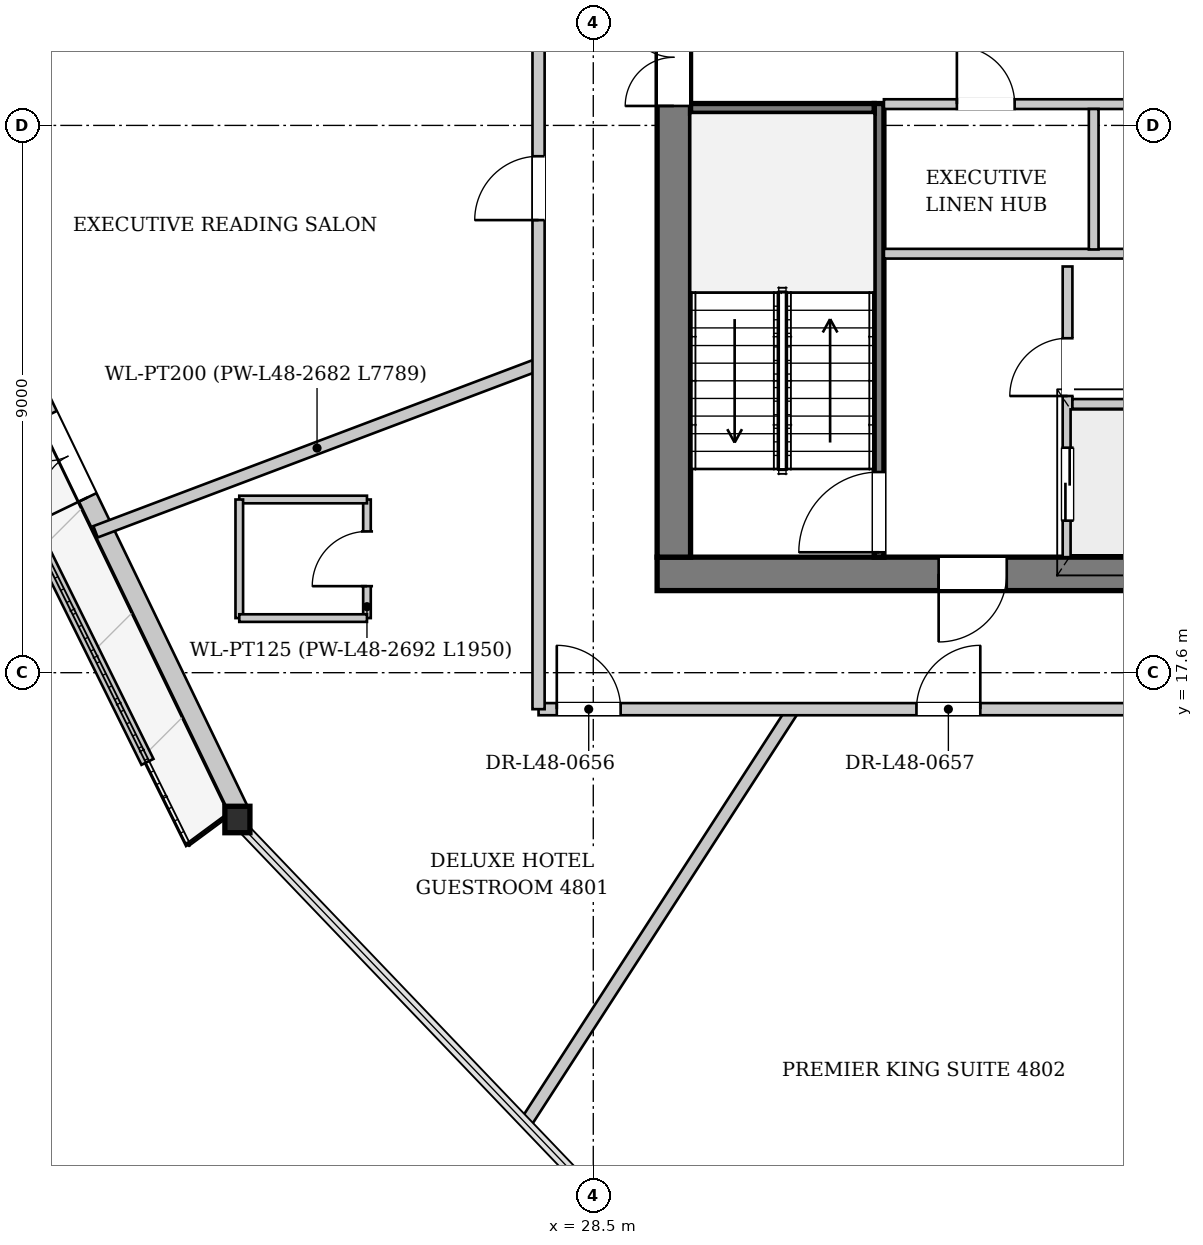
"""IFC4 building model, lengths in metres.
Left out: names, types, materials, properties, quantities, classifications, styles, units other than length and angle.
Written with IfcOpenShell. Run it as: python <this file> out.ifc"""

import sys

from ifc_helpers import new_model, si_unit, direction, frame, frame_2d, origin, origin_2d, place, context, subcontext, project, spatial, rectangle, i_section, extrude, source, transform, mapped, element, fill, save


model = new_model("IFC4")
c1 = context("Model", 3, precision=1e-05, world=origin(), true_north=direction((0.0, 1.0)))
c2 = subcontext(c1, "Body", "Model", "MODEL_VIEW")
j1 = project(units=[si_unit("LENGTHUNIT", "METRE"), si_unit("PLANEANGLEUNIT", "RADIAN")], contexts=[c1])
p1 = place(None, origin())
s1 = spatial("IfcSite", under=j1, at=p1, CompositionType="ELEMENT")
p2 = place(p1, origin())
s2 = spatial("IfcBuilding", under=s1, at=p2, CompositionType="ELEMENT")
p3 = place(p2, frame((0.0, 0.0, 182.1)))
s3 = spatial("IfcBuildingStorey", under=s2, at=p3, CompositionType="ELEMENT", Elevation=182.1)
m1 = source(origin(), c2, "Body", "SweptSolid", [
    extrude(i_section(OverallWidth=0.412, OverallDepth=0.435, WebThickness=0.031, FlangeThickness=0.05, at=origin_2d()), origin(), (0.0, 0.0, 1.0), 3.4),
])
p4 = place(p3, frame((22.519, 15.279, 0.0), z_axis=(0.07518697246, -0.054648792781, 0.995670843512), x_axis=(0.587941984646, 0.808903098455, 0.0)))
e1 = element("IfcColumn", 1, at=p4, inside=s3, PredefinedType="COLUMN", context=c2, shape_type="MappedRepresentation", body=[
    mapped(m1, transform((0.0, 0.0, 0.0), x_axis=(1.0, 0.0, 0.0), y_axis=(0.0, 1.0, 0.0), z_axis=(0.0, 0.0, 1.0), scale=1.0)),
])
p5 = place(p3, frame((22.664, 15.348, 0.0), z_axis=(0.0, 0.0, 1.0), x_axis=(-0.434690054068, 0.900580122418, 0.0)))
e2 = element("IfcWall", 2, at=p5, inside=s3, PredefinedType="SOLIDWALL", context=c2, shape_type="SweptSolid", body=[
    extrude(rectangle(XDim=17.818, YDim=0.32, at=frame_2d((8.909, 0.0))), origin(), (0.0, 0.0, 1.0), 2.722),
])
p6 = place(p5, frame((5.702, 0.0, 0.0)))
e3 = element("IfcOpeningElement", 3, at=p6, cuts=e2, PredefinedType="OPENING", context=c2, shape_type="SweptSolid", body=[
    extrude(rectangle(XDim=1.5, YDim=2.3, at=frame_2d((0.75, 1.15))), frame((0.0, 0.17, 0.0), z_axis=(0.0, -1.0, 0.0), x_axis=(1.0, 0.0, 0.0)), (0.0, 0.0, 1.0), 0.34),
])
p7 = place(p5, frame((11.885, 0.0, 0.252)))
e4 = element("IfcOpeningElement", 4, at=p7, cuts=e2, PredefinedType="OPENING", context=c2, shape_type="SweptSolid", body=[
    extrude(rectangle(XDim=2.6, YDim=2.35, at=frame_2d((1.3, 1.175))), frame((0.0, 0.17, 0.0), z_axis=(0.0, -1.0, 0.0), x_axis=(1.0, 0.0, 0.0)), (0.0, 0.0, 1.0), 0.34),
])
p8 = place(p3, frame((14.129, 30.381, 0.0), z_axis=(0.0, 0.0, 1.0), x_axis=(0.442956113231, -0.896543296083, 0.0)))
e5 = element("IfcWall", 5, at=p8, inside=s3, PredefinedType="PARAPET", context=c2, shape_type="SweptSolid", body=[
    extrude(rectangle(XDim=15.892, YDim=0.22, at=frame_2d((7.946, 0.0))), origin(), (0.0, 0.0, 1.0), 0.3),
])
p9 = place(p3, frame((46.45, 19.225, 0.0), z_axis=(0.0, 0.0, 1.0), x_axis=(-1.0, 0.0, 0.0)))
e6 = element("IfcWall", 6, at=p9, inside=s3, PredefinedType="SHEAR", context=c2, shape_type="SweptSolid", body=[
    extrude(rectangle(XDim=16.9, YDim=0.55, at=frame_2d((8.45, 0.0))), origin(), (0.0, 0.0, 1.0), 3.33),
])
p10 = place(p9, frame((4.65, 0.0, 0.0)))
e7 = element("IfcOpeningElement", 7, at=p10, cuts=e6, PredefinedType="OPENING", context=c2, shape_type="SweptSolid", body=[
    extrude(rectangle(XDim=1.12, YDim=2.25, at=frame_2d((0.56, 1.125))), frame((0.0, 0.285, 0.0), z_axis=(0.0, -1.0, 0.0), x_axis=(1.0, 0.0, 0.0)), (0.0, 0.0, 1.0), 0.57),
])
p11 = place(p9, frame((11.15, 0.0, 0.0)))
e8 = element("IfcOpeningElement", 8, at=p11, cuts=e6, PredefinedType="OPENING", context=c2, shape_type="SweptSolid", body=[
    extrude(rectangle(XDim=1.12, YDim=2.25, at=frame_2d((0.56, 1.125))), frame((0.0, 0.285, 0.0), z_axis=(0.0, -1.0, 0.0), x_axis=(1.0, 0.0, 0.0)), (0.0, 0.0, 1.0), 0.57),
])
p12 = place(p3, frame((29.825, 19.5, 0.0), z_axis=(0.0, 0.0, 1.0), x_axis=(0.0, 1.0, 0.0)))
e9 = element("IfcWall", 9, at=p12, inside=s3, PredefinedType="SHEAR", context=c2, shape_type="SweptSolid", body=[
    extrude(rectangle(XDim=14.2, YDim=0.55, at=frame_2d((7.1, 0.0))), origin(), (0.0, 0.0, 1.0), 3.33),
])
p13 = place(p12, frame((7.42, 0.0, 0.0)))
e10 = element("IfcOpeningElement", 10, at=p13, cuts=e9, PredefinedType="OPENING", context=c2, shape_type="SweptSolid", body=[
    extrude(rectangle(XDim=1.6, YDim=2.2, at=frame_2d((0.8, 1.1))), frame((0.0, 0.285, 0.0), z_axis=(0.0, -1.0, 0.0), x_axis=(1.0, 0.0, 0.0)), (0.0, 0.0, 1.0), 0.57),
])
p14 = place(p3, frame((33.2, 19.5, 0.0), z_axis=(0.0, 0.0, 1.0), x_axis=(0.0, 1.0, 0.0)))
e11 = element("IfcWall", 11, at=p14, inside=s3, PredefinedType="PARTITIONING", context=c2, shape_type="SweptSolid", body=[
    extrude(rectangle(XDim=7.46, YDim=0.16, at=frame_2d((3.73, 0.0))), origin(), (0.0, 0.0, 1.0), 3.33),
])
p15 = place(p14, frame((0.08, 0.0, 0.0)))
e12 = element("IfcOpeningElement", 12, at=p15, cuts=e11, PredefinedType="OPENING", context=c2, shape_type="SweptSolid", body=[
    extrude(rectangle(XDim=1.32, YDim=2.2, at=frame_2d((0.66, 1.1))), frame((0.0, 0.09, 0.0), z_axis=(0.0, -1.0, 0.0), x_axis=(1.0, 0.0, 0.0)), (0.0, 0.0, 1.0), 0.18),
])
p16 = place(p3, frame((30.1, 26.88, 0.0), z_axis=(0.0, 0.0, 1.0), x_axis=(1.0, 0.0, 0.0)))
e13 = element("IfcWall", 13, at=p16, inside=s3, PredefinedType="PARTITIONING", context=c2, shape_type="SweptSolid", body=[
    extrude(rectangle(XDim=3.02, YDim=0.16, at=frame_2d((1.51, 0.0))), origin(), (0.0, 0.0, 1.0), 3.33),
])
p17 = place(p3, frame((36.3, 19.5, 0.0), z_axis=(0.0, 0.0, 1.0), x_axis=(0.0, 1.0, 0.0)))
e14 = element("IfcWall", 14, at=p17, inside=s3, PredefinedType="PARTITIONING", context=c2, shape_type="SweptSolid", body=[
    extrude(rectangle(XDim=4.78, YDim=0.16, at=frame_2d((2.39, 0.0))), origin(), (0.0, 0.0, 1.0), 3.33),
])
p18 = place(p17, frame((0.6, 0.0, 0.0)))
e15 = element("IfcOpeningElement", 15, at=p18, cuts=e14, PredefinedType="OPENING", context=c2, shape_type="SweptSolid", body=[
    extrude(rectangle(XDim=1.2, YDim=2.2, at=frame_2d((0.6, 1.1))), frame((0.0, 0.09, 0.0), z_axis=(0.0, -1.0, 0.0), x_axis=(1.0, 0.0, 0.0)), (0.0, 0.0, 1.0), 0.18),
])
p19 = place(p17, frame((2.65, 0.0, 0.0)))
e16 = element("IfcOpeningElement", 16, at=p19, cuts=e14, PredefinedType="OPENING", context=c2, shape_type="SweptSolid", body=[
    extrude(rectangle(XDim=0.95, YDim=2.1, at=frame_2d((0.475, 1.05))), frame((0.0, 0.09, 0.0), z_axis=(0.0, -1.0, 0.0), x_axis=(1.0, 0.0, 0.0)), (0.0, 0.0, 1.0), 0.18),
])
p20 = place(p3, frame((36.38, 22.02, 0.0), z_axis=(0.0, 0.0, 1.0), x_axis=(1.0, 0.0, 0.0)))
e17 = element("IfcWall", 17, at=p20, inside=s3, PredefinedType="PARTITIONING", context=c2, shape_type="SweptSolid", body=[
    extrude(rectangle(XDim=3.24, YDim=0.16, at=frame_2d((1.62, 0.0))), origin(), (0.0, 0.0, 1.0), 3.33),
])
p21 = place(p3, frame((33.28, 24.49, 0.0), z_axis=(0.0, 0.0, 1.0), x_axis=(1.0, 0.0, 0.0)))
e18 = element("IfcWall", 18, at=p21, inside=s3, PredefinedType="PARTITIONING", context=c2, shape_type="SweptSolid", body=[
    extrude(rectangle(XDim=9.44, YDim=0.16, at=frame_2d((4.72, 0.0))), origin(), (0.0, 0.0, 1.0), 3.33),
])
p22 = place(p3, frame((33.28, 26.95, 0.0), z_axis=(0.0, 0.0, 1.0), x_axis=(1.0, 0.0, 0.0)))
e19 = element("IfcWall", 19, at=p22, inside=s3, PredefinedType="PARTITIONING", context=c2, shape_type="SweptSolid", body=[
    extrude(rectangle(XDim=9.44, YDim=0.16, at=frame_2d((4.72, 0.0))), origin(), (0.0, 0.0, 1.0), 3.33),
])
p23 = place(p22, frame((1.2, 0.0, 0.0)))
e20 = element("IfcOpeningElement", 20, at=p23, cuts=e19, PredefinedType="OPENING", context=c2, shape_type="SweptSolid", body=[
    extrude(rectangle(XDim=0.95, YDim=2.1, at=frame_2d((0.475, 1.05))), frame((0.0, 0.09, 0.0), z_axis=(0.0, -1.0, 0.0), x_axis=(1.0, 0.0, 0.0)), (0.0, 0.0, 1.0), 0.18),
])
p24 = place(p22, frame((4.65, 0.0, 0.0)))
e21 = element("IfcOpeningElement", 21, at=p24, cuts=e19, PredefinedType="OPENING", context=c2, shape_type="SweptSolid", body=[
    extrude(rectangle(XDim=0.95, YDim=2.1, at=frame_2d((0.475, 1.05))), frame((0.0, 0.09, 0.0), z_axis=(0.0, -1.0, 0.0), x_axis=(1.0, 0.0, 0.0)), (0.0, 0.0, 1.0), 0.18),
])
p25 = place(p22, frame((7.67, 0.0, 0.0)))
e22 = element("IfcOpeningElement", 22, at=p25, cuts=e19, PredefinedType="OPENING", context=c2, shape_type="SweptSolid", body=[
    extrude(rectangle(XDim=1.1, YDim=2.2, at=frame_2d((0.55, 1.1))), frame((0.0, 0.09, 0.0), z_axis=(0.0, -1.0, 0.0), x_axis=(1.0, 0.0, 0.0)), (0.0, 0.0, 1.0), 0.18),
])
p26 = place(p3, frame((36.73, 24.56, 0.0), z_axis=(0.0, 0.0, 1.0), x_axis=(0.0, 1.0, 0.0)))
e23 = element("IfcWall", 23, at=p26, inside=s3, PredefinedType="PARTITIONING", context=c2, shape_type="SweptSolid", body=[
    extrude(rectangle(XDim=2.31, YDim=0.16, at=frame_2d((1.155, 0.0))), origin(), (0.0, 0.0, 1.0), 3.33),
])
p27 = place(p3, frame((27.6, 22.67, 0.0), z_axis=(0.0, 0.0, 1.0), x_axis=(-0.935445148769, -0.353471885225, 0.0)))
e24 = element("IfcWall", 24, at=p27, inside=s3, PredefinedType="PARTITIONING", context=c2, shape_type="SweptSolid", body=[
    extrude(rectangle(XDim=7.789, YDim=0.2, at=frame_2d((3.895, 0.0))), origin(), (0.0, 0.0, 1.0), 3.33),
])
p28 = place(p3, frame((31.791, 17.0, 0.0), z_axis=(0.0, 0.0, 1.0), x_axis=(-0.543103391012, -0.839665830358, 0.0)))
e25 = element("IfcWall", 25, at=p28, inside=s3, PredefinedType="PARTITIONING", context=c2, shape_type="SweptSolid", body=[
    extrude(rectangle(XDim=8.078, YDim=0.2, at=frame_2d((4.039, 0.0))), origin(), (0.0, 0.0, 1.0), 3.33),
])
p29 = place(p3, frame((24.778, 18.498, 0.0), z_axis=(0.0, 0.0, 1.0), x_axis=(0.0, 1.0, 0.0)))
e26 = element("IfcWall", 26, at=p29, inside=s3, PredefinedType="PARTITIONING", context=c2, shape_type="SweptSolid", body=[
    extrude(rectangle(XDim=1.95, YDim=0.125, at=frame_2d((0.975, 0.0))), origin(), (0.0, 0.0, 1.0), 3.015),
])
p30 = place(p29, frame((0.525, 0.0, 0.0)))
e27 = element("IfcOpeningElement", 27, at=p30, cuts=e26, PredefinedType="OPENING", context=c2, shape_type="SweptSolid", body=[
    extrude(rectangle(XDim=0.9, YDim=2.1, at=frame_2d((0.45, 1.05))), frame((0.0, 0.073, 0.0), z_axis=(0.0, -1.0, 0.0), x_axis=(1.0, 0.0, 0.0)), (0.0, 0.0, 1.0), 0.145),
])
p31 = place(p3, frame((24.778, 20.448, 0.0), z_axis=(0.0, 0.0, 1.0), x_axis=(-1.0, 0.0, 0.0)))
e28 = element("IfcWall", 28, at=p31, inside=s3, PredefinedType="PARTITIONING", context=c2, shape_type="SweptSolid", body=[
    extrude(rectangle(XDim=2.1, YDim=0.125, at=frame_2d((1.05, 0.0))), origin(), (0.0, 0.0, 1.0), 3.33),
])
p32 = place(p3, frame((22.678, 20.448, 0.0), z_axis=(0.0, 0.0, 1.0), x_axis=(0.0, -1.0, 0.0)))
e29 = element("IfcWall", 29, at=p32, inside=s3, PredefinedType="PARTITIONING", context=c2, shape_type="SweptSolid", body=[
    extrude(rectangle(XDim=1.95, YDim=0.125, at=frame_2d((0.975, 0.0))), origin(), (0.0, 0.0, 1.0), 3.33),
])
p33 = place(p3, frame((22.678, 18.498, 0.0), z_axis=(0.0, 0.0, 1.0), x_axis=(1.0, 0.0, 0.0)))
e30 = element("IfcWall", 30, at=p33, inside=s3, PredefinedType="PARTITIONING", context=c2, shape_type="SweptSolid", body=[
    extrude(rectangle(XDim=2.1, YDim=0.125, at=frame_2d((1.05, 0.0))), origin(), (0.0, 0.0, 1.0), 3.33),
])
p34 = place(p3, frame((27.6, 17.0, 0.0), z_axis=(0.0, 0.0, 1.0), x_axis=(1.0, 0.0, 0.0)))
e31 = element("IfcWall", 31, at=p34, inside=s3, PredefinedType="PARTITIONING", context=c2, shape_type="SweptSolid", body=[
    extrude(rectangle(XDim=20.8, YDim=0.2, at=frame_2d((10.4, 0.0))), origin(), (0.0, 0.0, 1.0), 3.33),
])
p35 = place(p34, frame((0.3, 0.0, 0.0)))
e32 = element("IfcOpeningElement", 32, at=p35, cuts=e31, PredefinedType="OPENING", context=c2, shape_type="SweptSolid", body=[
    extrude(rectangle(XDim=1.05, YDim=2.2, at=frame_2d((0.525, 1.1))), frame((0.0, 0.11, 0.0), z_axis=(0.0, -1.0, 0.0), x_axis=(1.0, 0.0, 0.0)), (0.0, 0.0, 1.0), 0.22),
])
p36 = place(p34, frame((6.215, 0.0, 0.0)))
e33 = element("IfcOpeningElement", 33, at=p36, cuts=e31, PredefinedType="OPENING", context=c2, shape_type="SweptSolid", body=[
    extrude(rectangle(XDim=1.05, YDim=2.2, at=frame_2d((0.525, 1.1))), frame((0.0, 0.11, 0.0), z_axis=(0.0, -1.0, 0.0), x_axis=(1.0, 0.0, 0.0)), (0.0, 0.0, 1.0), 0.22),
])
p37 = place(p34, frame((14.998, 0.0, 0.0)))
e34 = element("IfcOpeningElement", 34, at=p37, cuts=e31, PredefinedType="OPENING", context=c2, shape_type="SweptSolid", body=[
    extrude(rectangle(XDim=1.05, YDim=2.2, at=frame_2d((0.525, 1.1))), frame((0.0, 0.11, 0.0), z_axis=(0.0, -1.0, 0.0), x_axis=(1.0, 0.0, 0.0)), (0.0, 0.0, 1.0), 0.22),
])
p38 = place(p34, frame((19.45, 0.0, 0.0)))
e35 = element("IfcOpeningElement", 35, at=p38, cuts=e31, PredefinedType="OPENING", context=c2, shape_type="SweptSolid", body=[
    extrude(rectangle(XDim=1.05, YDim=2.2, at=frame_2d((0.525, 1.1))), frame((0.0, 0.11, 0.0), z_axis=(0.0, -1.0, 0.0), x_axis=(1.0, 0.0, 0.0)), (0.0, 0.0, 1.0), 0.22),
])
p39 = place(p3, frame((27.6, 17.0, 0.0), z_axis=(0.0, 0.0, 1.0), x_axis=(0.0, 1.0, 0.0)))
e36 = element("IfcWall", 36, at=p39, inside=s3, PredefinedType="PARTITIONING", context=c2, shape_type="SweptSolid", body=[
    extrude(rectangle(XDim=19.2, YDim=0.2, at=frame_2d((9.6, 0.0))), origin(), (0.0, 0.0, 1.0), 3.33),
])
p40 = place(p39, frame((17.85, 0.0, 0.0)))
e37 = element("IfcOpeningElement", 37, at=p40, cuts=e36, PredefinedType="OPENING", context=c2, shape_type="SweptSolid", body=[
    extrude(rectangle(XDim=1.05, YDim=2.2, at=frame_2d((0.525, 1.1))), frame((0.0, 0.11, 0.0), z_axis=(0.0, -1.0, 0.0), x_axis=(1.0, 0.0, 0.0)), (0.0, 0.0, 1.0), 0.22),
])
p41 = place(p39, frame((8.043, 0.0, 0.0)))
e38 = element("IfcOpeningElement", 38, at=p41, cuts=e36, PredefinedType="OPENING", context=c2, shape_type="SweptSolid", body=[
    extrude(rectangle(XDim=1.05, YDim=2.2, at=frame_2d((0.525, 1.1))), frame((0.0, 0.11, 0.0), z_axis=(0.0, -1.0, 0.0), x_axis=(1.0, 0.0, 0.0)), (0.0, 0.0, 1.0), 0.22),
])
m2 = source(origin(), c2, "Body", "SweptSolid", [
    extrude(rectangle(XDim=1.5, YDim=2.3, at=frame_2d((0.75, 1.15))), frame((0.0, 0.025, 0.0), z_axis=(0.0, -1.0, 0.0), x_axis=(1.0, 0.0, 0.0)), (0.0, 0.0, 1.0), 0.05),
])
p42 = place(p6, origin())
e39 = element("IfcDoor", 39, at=p42, inside=s3, OperationType="DOUBLE_DOOR_SINGLE_SWING", PredefinedType="DOOR", context=c2, shape_type="MappedRepresentation", body=[
    mapped(m2, transform((0.0, 0.0, 0.0), x_axis=(1.0, 0.0, 0.0), y_axis=(0.0, 1.0, 0.0), z_axis=(0.0, 0.0, 1.0), scale=1.0)),
])
fill(e3, e39)
m3 = source(origin(), c2, "Body", "SweptSolid", [
    extrude(rectangle(XDim=1.12, YDim=2.25, at=frame_2d((0.56, 1.125))), frame((0.0, 0.025, 0.0), z_axis=(0.0, -1.0, 0.0), x_axis=(1.0, 0.0, 0.0)), (0.0, 0.0, 1.0), 0.05),
])
p43 = place(p11, origin())
e40 = element("IfcDoor", 40, at=p43, inside=s3, OperationType="SINGLE_SWING_RIGHT", PredefinedType="DOOR", context=c2, shape_type="MappedRepresentation", body=[
    mapped(m3, transform((0.0, 0.0, 0.0), x_axis=(1.0, 0.0, 0.0), y_axis=(0.0, 1.0, 0.0), z_axis=(0.0, 0.0, 1.0), scale=1.0)),
])
fill(e8, e40)
m4 = source(origin(), c2, "Body", "SweptSolid", [
    extrude(rectangle(XDim=1.6, YDim=2.2, at=frame_2d((0.8, 1.1))), frame((0.0, 0.025, 0.0), z_axis=(0.0, -1.0, 0.0), x_axis=(1.0, 0.0, 0.0)), (0.0, 0.0, 1.0), 0.05),
])
p44 = place(p13, origin())
e41 = element("IfcDoor", 41, at=p44, inside=s3, OperationType="DOUBLE_DOOR_SINGLE_SWING", PredefinedType="DOOR", context=c2, shape_type="MappedRepresentation", body=[
    mapped(m4, transform((0.0, 0.0, 0.0), x_axis=(1.0, 0.0, 0.0), y_axis=(0.0, 1.0, 0.0), z_axis=(0.0, 0.0, 1.0), scale=1.0)),
])
fill(e10, e41)
m5 = source(origin(), c2, "Body", "SweptSolid", [
    extrude(rectangle(XDim=1.32, YDim=2.2, at=frame_2d((0.66, 1.1))), frame((0.0, 0.025, 0.0), z_axis=(0.0, -1.0, 0.0), x_axis=(1.0, 0.0, 0.0)), (0.0, 0.0, 1.0), 0.05),
])
p45 = place(p15, origin())
e42 = element("IfcDoor", 42, at=p45, inside=s3, OperationType="SINGLE_SWING_LEFT", PredefinedType="DOOR", context=c2, shape_type="MappedRepresentation", body=[
    mapped(m5, transform((0.0, 0.0, 0.0), x_axis=(1.0, 0.0, 0.0), y_axis=(0.0, 1.0, 0.0), z_axis=(0.0, 0.0, 1.0), scale=1.0)),
])
fill(e12, e42)
m6 = source(origin(), c2, "Body", "SweptSolid", [
    extrude(rectangle(XDim=1.2, YDim=2.2, at=frame_2d((0.6, 1.1))), frame((0.0, 0.025, 0.0), z_axis=(0.0, -1.0, 0.0), x_axis=(1.0, 0.0, 0.0)), (0.0, 0.0, 1.0), 0.05),
])
p46 = place(p18, origin())
e43 = element("IfcDoor", 43, at=p46, inside=s3, OperationType="DOUBLE_DOOR_SLIDING", PredefinedType="DOOR", context=c2, shape_type="MappedRepresentation", body=[
    mapped(m6, transform((0.0, 0.0, 0.0), x_axis=(1.0, 0.0, 0.0), y_axis=(0.0, 1.0, 0.0), z_axis=(0.0, 0.0, 1.0), scale=1.0)),
])
fill(e15, e43)
m7 = source(origin(), c2, "Body", "SweptSolid", [
    extrude(rectangle(XDim=0.95, YDim=2.1, at=frame_2d((0.475, 1.05))), frame((0.0, 0.025, 0.0), z_axis=(0.0, -1.0, 0.0), x_axis=(1.0, 0.0, 0.0)), (0.0, 0.0, 1.0), 0.05),
])
p47 = place(p19, origin())
e44 = element("IfcDoor", 44, at=p47, inside=s3, OperationType="SINGLE_SWING_LEFT", PredefinedType="DOOR", context=c2, shape_type="MappedRepresentation", body=[
    mapped(m7, transform((0.0, 0.0, 0.0), x_axis=(1.0, 0.0, 0.0), y_axis=(0.0, 1.0, 0.0), z_axis=(0.0, 0.0, 1.0), scale=1.0)),
])
fill(e16, e44)
p48 = place(p23, origin())
e45 = element("IfcDoor", 45, at=p48, inside=s3, OperationType="SINGLE_SWING_LEFT", PredefinedType="DOOR", context=c2, shape_type="MappedRepresentation", body=[
    mapped(m7, transform((0.0, 0.0, 0.0), x_axis=(1.0, 0.0, 0.0), y_axis=(0.0, 1.0, 0.0), z_axis=(0.0, 0.0, 1.0), scale=1.0)),
])
fill(e20, e45)
m8 = source(origin(), c2, "Body", "SweptSolid", [
    extrude(rectangle(XDim=0.9, YDim=2.1, at=frame_2d((0.45, 1.05))), frame((0.0, 0.025, 0.0), z_axis=(0.0, -1.0, 0.0), x_axis=(1.0, 0.0, 0.0)), (0.0, 0.0, 1.0), 0.05),
])
p49 = place(p30, origin())
e46 = element("IfcDoor", 46, at=p49, inside=s3, OperationType="SINGLE_SWING_LEFT", PredefinedType="DOOR", context=c2, shape_type="MappedRepresentation", body=[
    mapped(m8, transform((0.0, 0.0, 0.0), x_axis=(1.0, 0.0, 0.0), y_axis=(0.0, 1.0, 0.0), z_axis=(0.0, 0.0, 1.0), scale=1.0)),
])
fill(e27, e46)
m9 = source(origin(), c2, "Body", "SweptSolid", [
    extrude(rectangle(XDim=1.05, YDim=2.2, at=frame_2d((0.525, 1.1))), frame((0.0, 0.025, 0.0), z_axis=(0.0, -1.0, 0.0), x_axis=(1.0, 0.0, 0.0)), (0.0, 0.0, 1.0), 0.05),
])
p50 = place(p35, origin())
e47 = element("IfcDoor", 47, at=p50, inside=s3, OperationType="SINGLE_SWING_LEFT", PredefinedType="DOOR", context=c2, shape_type="MappedRepresentation", body=[
    mapped(m9, transform((0.0, 0.0, 0.0), x_axis=(1.0, 0.0, 0.0), y_axis=(0.0, 1.0, 0.0), z_axis=(0.0, 0.0, 1.0), scale=1.0)),
])
fill(e32, e47)
p51 = place(p36, origin())
e48 = element("IfcDoor", 48, at=p51, inside=s3, OperationType="SINGLE_SWING_RIGHT", PredefinedType="DOOR", context=c2, shape_type="MappedRepresentation", body=[
    mapped(m9, transform((0.0, 0.0, 0.0), x_axis=(1.0, 0.0, 0.0), y_axis=(0.0, 1.0, 0.0), z_axis=(0.0, 0.0, 1.0), scale=1.0)),
])
fill(e33, e48)
p52 = place(p41, origin())
e49 = element("IfcDoor", 49, at=p52, inside=s3, OperationType="SINGLE_SWING_LEFT", PredefinedType="DOOR", context=c2, shape_type="MappedRepresentation", body=[
    mapped(m9, transform((0.0, 0.0, 0.0), x_axis=(1.0, 0.0, 0.0), y_axis=(0.0, 1.0, 0.0), z_axis=(0.0, 0.0, 1.0), scale=1.0)),
])
fill(e38, e49)
save(model, sys.argv[1])
